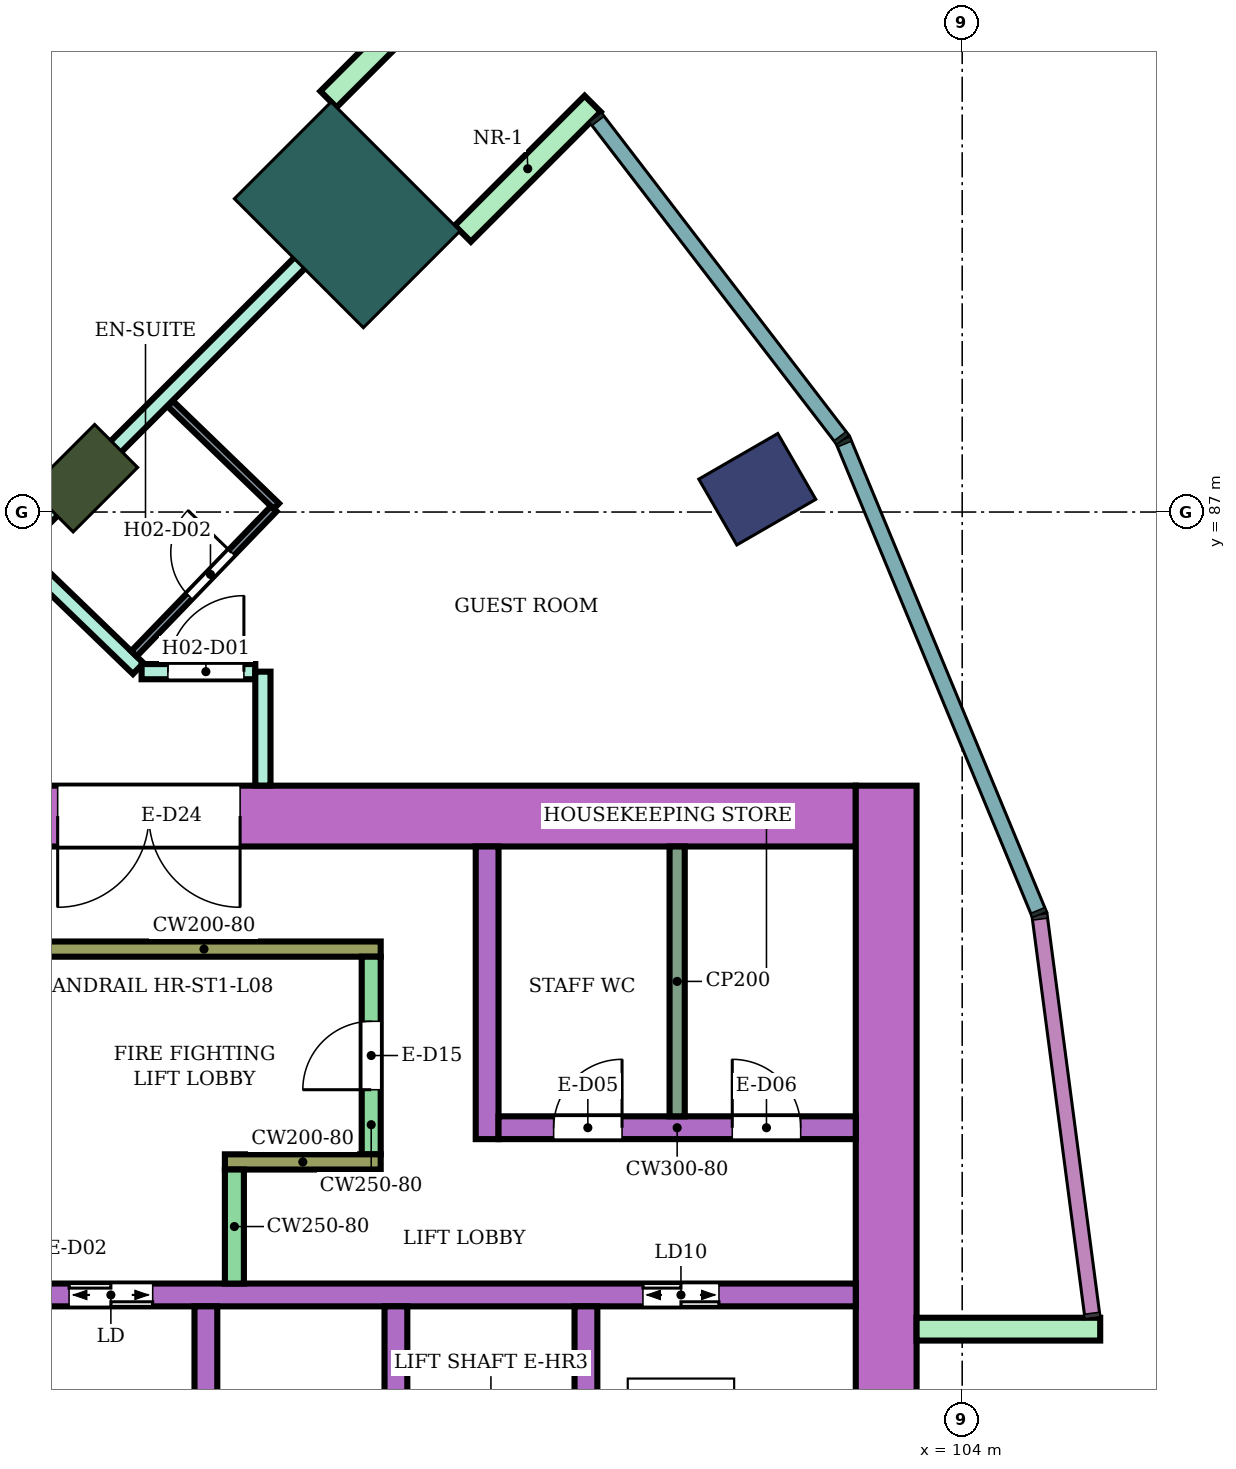
"""IFC4 building model, lengths in metres.
Left out: names, types, materials, properties, quantities, classifications, styles, units other than length and angle.
Written with IfcOpenShell. Run it as: python <this file> out.ifc"""

import sys

from ifc_helpers import new_model, si_unit, direction, frame, frame_2d, origin, origin_2d, place, context, subcontext, project, spatial, rectangle, extrude, element, fill, save


model = new_model("IFC4")
c1 = context("Model", 3, precision=1e-05, world=origin(), true_north=direction((0.0, 1.0)))
c2 = subcontext(c1, "Body", "Model", "MODEL_VIEW")
j1 = project(units=[si_unit("LENGTHUNIT", "METRE"), si_unit("PLANEANGLEUNIT", "RADIAN")], contexts=[c1])
p1 = place(None, origin())
s1 = spatial("IfcSite", under=j1, at=p1, CompositionType="ELEMENT")
p2 = place(p1, origin())
s2 = spatial("IfcBuilding", under=s1, at=p2, CompositionType="ELEMENT")
p3 = place(p2, frame((0.0, 0.0, 40.2)))
s3 = spatial("IfcBuildingStorey", under=s2, at=p3, CompositionType="ELEMENT", Elevation=40.2)
p4 = place(p3, frame((101.304, 87.3, 0.0), z_axis=(0.0, 0.0, 1.0), x_axis=(0.866025403784, 0.5, 0.0)))
e1 = element("IfcColumn", 1, at=p4, inside=s3, PredefinedType="COLUMN", context=c2, shape_type="SweptSolid", body=[
    extrude(rectangle(XDim=1.2, YDim=1.0, at=origin_2d()), origin(), (0.0, 0.0, 1.0), 3.8),
])
p5 = place(p3, frame((92.445, 87.445, 0.0), z_axis=(0.0, 0.0, 1.0), x_axis=(0.707106781187, 0.707106781187, 0.0)))
e2 = element("IfcColumn", 2, at=p5, inside=s3, PredefinedType="COLUMN", context=c2, shape_type="SweptSolid", body=[
    extrude(rectangle(XDim=1.2, YDim=0.8, at=origin_2d()), origin(), (0.0, 0.0, 1.0), 3.8),
])
p6 = place(p3, frame((95.91, 90.91, 0.0), z_axis=(0.0, 0.0, 1.0), x_axis=(0.707106781187, 0.707106781187, 0.0)))
e3 = element("IfcColumn", 3, at=p6, inside=s3, PredefinedType="COLUMN", context=c2, shape_type="SweptSolid", body=[
    extrude(rectangle(XDim=1.8, YDim=2.4, at=origin_2d()), origin(), (0.0, 0.0, 1.0), 3.8),
])
p7 = place(p3, frame((87.9, 83.0, 0.0), z_axis=(0.0, 0.0, 1.0), x_axis=(1.0, 0.0, 0.0)))
e4 = element("IfcWall", 4, at=p7, inside=s3, PredefinedType="SHEAR", context=c2, shape_type="SweptSolid", body=[
    extrude(rectangle(XDim=14.7, YDim=0.8, at=frame_2d((7.35, 0.0))), origin(), (0.0, 0.0, 1.0), 3.48),
])
p8 = place(p7, frame((4.2, 0.0, 0.0)))
e5 = element("IfcOpeningElement", 5, at=p8, cuts=e4, PredefinedType="OPENING", context=c2, shape_type="SweptSolid", body=[
    extrude(rectangle(XDim=2.4, YDim=2.4, at=frame_2d((1.2, 1.2))), frame((0.0, 0.41, 0.0), z_axis=(0.0, -1.0, 0.0), x_axis=(1.0, 0.0, 0.0)), (0.0, 0.0, 1.0), 0.82),
])
p9 = place(p3, frame((103.0, 66.6, 0.0), z_axis=(0.0, 0.0, 1.0), x_axis=(0.0, 1.0, 0.0)))
e6 = element("IfcWall", 6, at=p9, inside=s3, PredefinedType="SHEAR", context=c2, shape_type="SweptSolid", body=[
    extrude(rectangle(XDim=16.8, YDim=0.8, at=frame_2d((8.4, 0.0))), origin(), (0.0, 0.0, 1.0), 3.48),
])
p10 = place(p3, frame((91.7, 76.7, 0.0), z_axis=(0.0, 0.0, 1.0), x_axis=(1.0, 0.0, 0.0)))
e7 = element("IfcWall", 7, at=p10, inside=s3, PredefinedType="SHEAR", context=c2, shape_type="SweptSolid", body=[
    extrude(rectangle(XDim=10.9, YDim=0.3, at=frame_2d((5.45, 0.0))), origin(), (0.0, 0.0, 1.0), 3.48),
])
p11 = place(p10, frame((0.55, 0.0, 0.0)))
e8 = element("IfcOpeningElement", 8, at=p11, cuts=e7, PredefinedType="OPENING", context=c2, shape_type="SweptSolid", body=[
    extrude(rectangle(XDim=1.1, YDim=2.1, at=frame_2d((0.55, 1.05))), frame((0.0, 0.16, 0.0), z_axis=(0.0, -1.0, 0.0), x_axis=(1.0, 0.0, 0.0)), (0.0, 0.0, 1.0), 0.32),
])
p12 = place(p10, frame((8.1, 0.0, 0.0)))
e9 = element("IfcOpeningElement", 9, at=p12, cuts=e7, PredefinedType="OPENING", context=c2, shape_type="SweptSolid", body=[
    extrude(rectangle(XDim=1.0, YDim=2.1, at=frame_2d((0.5, 1.05))), frame((0.0, 0.16, 0.0), z_axis=(0.0, -1.0, 0.0), x_axis=(1.0, 0.0, 0.0)), (0.0, 0.0, 1.0), 0.32),
])
for number, where, z_axis, x_axis in (
    (10, (94.05, 74.0, 0.0), (0.0, 0.0, 1.0), (0.0, 1.0, 0.0)),
    (11, (96.55, 74.0, 0.0), (0.0, 0.0, 1.0), (0.0, 1.0, 0.0)),
    (12, (99.05, 74.0, 0.0), (0.0, 0.0, 1.0), (0.0, 1.0, 0.0)),
):
    element("IfcWall", number, at=place(p3, frame(where, z_axis=z_axis, x_axis=x_axis)), inside=s3, PredefinedType="SHEAR", context=c2, shape_type="SweptSolid", body=[
        extrude(rectangle(XDim=2.55, YDim=0.3, at=frame_2d((1.275, 0.0))), origin(), (0.0, 0.0, 1.0), 3.48),
    ])
p13 = place(p3, frame((91.7, 81.25, 0.0), z_axis=(0.0, 0.0, 1.0), x_axis=(1.0, 0.0, 0.0)))
e13 = element("IfcWall", 13, at=p13, inside=s3, PredefinedType="SHEAR", context=c2, shape_type="SweptSolid", body=[
    extrude(rectangle(XDim=4.65, YDim=0.2, at=frame_2d((2.325, 0.0))), origin(), (0.0, 0.0, 1.0), 3.48),
])
p14 = place(p3, frame((96.225, 78.55, 0.0), z_axis=(0.0, 0.0, 1.0), x_axis=(0.0, 1.0, 0.0)))
e14 = element("IfcWall", 14, at=p14, inside=s3, PredefinedType="SHEAR", context=c2, shape_type="SweptSolid", body=[
    extrude(rectangle(XDim=2.6, YDim=0.25, at=frame_2d((1.3, 0.0))), origin(), (0.0, 0.0, 1.0), 3.48),
])
p15 = place(p14, frame((0.85, 0.0, 0.0)))
e15 = element("IfcOpeningElement", 15, at=p15, cuts=e14, PredefinedType="OPENING", context=c2, shape_type="SweptSolid", body=[
    extrude(rectangle(XDim=0.9, YDim=2.1, at=frame_2d((0.45, 1.05))), frame((0.0, 0.135, 0.0), z_axis=(0.0, -1.0, 0.0), x_axis=(1.0, 0.0, 0.0)), (0.0, 0.0, 1.0), 0.27),
])
p16 = place(p3, frame((94.3, 78.45, 0.0), z_axis=(0.0, 0.0, 1.0), x_axis=(1.0, 0.0, 0.0)))
e16 = element("IfcWall", 16, at=p16, inside=s3, PredefinedType="SHEAR", context=c2, shape_type="SweptSolid", body=[
    extrude(rectangle(XDim=2.05, YDim=0.2, at=frame_2d((1.025, 0.0))), origin(), (0.0, 0.0, 1.0), 3.48),
])
p17 = place(p3, frame((94.425, 76.85, 0.0), z_axis=(0.0, 0.0, 1.0), x_axis=(0.0, 1.0, 0.0)))
e17 = element("IfcWall", 17, at=p17, inside=s3, PredefinedType="SHEAR", context=c2, shape_type="SweptSolid", body=[
    extrude(rectangle(XDim=1.5, YDim=0.25, at=frame_2d((0.75, 0.0))), origin(), (0.0, 0.0, 1.0), 3.48),
])
p18 = place(p3, frame((97.75, 78.75, 0.0), z_axis=(0.0, 0.0, 1.0), x_axis=(0.0, 1.0, 0.0)))
e18 = element("IfcWall", 18, at=p18, inside=s3, PredefinedType="SHEAR", context=c2, shape_type="SweptSolid", body=[
    extrude(rectangle(XDim=3.85, YDim=0.3, at=frame_2d((1.925, 0.0))), origin(), (0.0, 0.0, 1.0), 3.48),
])
p19 = place(p3, frame((97.9, 78.9, 0.0), z_axis=(0.0, 0.0, 1.0), x_axis=(1.0, 0.0, 0.0)))
e19 = element("IfcWall", 19, at=p19, inside=s3, PredefinedType="SHEAR", context=c2, shape_type="SweptSolid", body=[
    extrude(rectangle(XDim=4.7, YDim=0.3, at=frame_2d((2.35, 0.0))), origin(), (0.0, 0.0, 1.0), 3.48),
])
p20 = place(p19, frame((0.725, 0.0, 0.0)))
e20 = element("IfcOpeningElement", 20, at=p20, cuts=e19, PredefinedType="OPENING", context=c2, shape_type="SweptSolid", body=[
    extrude(rectangle(XDim=0.9, YDim=2.1, at=frame_2d((0.45, 1.05))), frame((0.0, 0.16, 0.0), z_axis=(0.0, -1.0, 0.0), x_axis=(1.0, 0.0, 0.0)), (0.0, 0.0, 1.0), 0.32),
])
p21 = place(p19, frame((3.075, 0.0, 0.0)))
e21 = element("IfcOpeningElement", 21, at=p21, cuts=e19, PredefinedType="OPENING", context=c2, shape_type="SweptSolid", body=[
    extrude(rectangle(XDim=0.9, YDim=2.1, at=frame_2d((0.45, 1.05))), frame((0.0, 0.16, 0.0), z_axis=(0.0, -1.0, 0.0), x_axis=(1.0, 0.0, 0.0)), (0.0, 0.0, 1.0), 0.32),
])
for number, where, z_axis, x_axis in (
    (22, (103.4, 76.25, 0.0), (0.0, 0.0, 1.0), (1.0, 0.0, 0.0)),
    (23, (97.43, 90.662, 0.0), (0.0, 0.0, 1.0), (0.707, 0.707, 0.0)),
    (24, (95.662, 92.43, 0.0), (0.0, 0.0, 1.0), (0.707, 0.707, 0.0)),
):
    element("IfcWall", number, at=place(p3, frame(where, z_axis=z_axis, x_axis=x_axis)), inside=s3, PredefinedType="NOTDEFINED", context=c2, shape_type="SweptSolid", body=[
        extrude(rectangle(XDim=2.416, YDim=0.3, at=frame_2d((1.208, 0.0))), origin(), (0.0, 0.0, 1.0), 3.8),
    ])
p22 = place(p3, frame((88.465, 89.473, 0.0), z_axis=(0.0, 0.0, 1.0), x_axis=(0.719474304909, -0.694519059908, 0.0)))
e25 = element("IfcWall", 25, at=p22, inside=s3, PredefinedType="PARTITIONING", context=c2, shape_type="SweptSolid", body=[
    extrude(rectangle(XDim=6.525, YDim=0.2, at=frame_2d((3.263, 0.0))), origin(), (0.0, 0.0, 1.0), 3.35),
])
p23 = place(p22, frame((2.719, 0.0, 0.0)))
e26 = element("IfcOpeningElement", 26, at=p23, cuts=e25, PredefinedType="OPENING", context=c2, shape_type="SweptSolid", body=[
    extrude(rectangle(XDim=1.0, YDim=2.1, at=frame_2d((0.5, 1.05))), frame((0.0, 0.11, 0.0), z_axis=(0.0, -1.0, 0.0), x_axis=(1.0, 0.0, 0.0)), (0.0, 0.0, 1.0), 0.22),
])
p24 = place(p3, frame((88.397, 89.539, 0.0), z_axis=(0.0, 0.0, 1.0), x_axis=(0.500228379329, 0.86589350876, 0.0)))
e27 = element("IfcWall", 27, at=p24, inside=s3, PredefinedType="PARTITIONING", context=c2, shape_type="SweptSolid", body=[
    extrude(rectangle(XDim=9.008, YDim=0.2, at=frame_2d((4.504, 0.0))), origin(), (0.0, 0.0, 1.0), 3.35),
])
p25 = place(p3, frame((91.595, 86.59, 0.0), z_axis=(0.0, 0.0, 1.0), x_axis=(0.707232337591, 0.706981202484, 0.0)))
e28 = element("IfcWall", 28, at=p25, inside=s3, PredefinedType="PARTITIONING", context=c2, shape_type="SweptSolid", body=[
    extrude(rectangle(XDim=6.805, YDim=0.2, at=frame_2d((3.402, 0.0))), origin(), (0.0, 0.0, 1.0), 3.35),
])
p26 = place(p3, frame((93.204, 84.9, 0.0), z_axis=(0.0, 0.0, 1.0), x_axis=(1.0, 0.0, 0.0)))
e29 = element("IfcWall", 29, at=p26, inside=s3, PredefinedType="PARTITIONING", context=c2, shape_type="SweptSolid", body=[
    extrude(rectangle(XDim=1.496, YDim=0.2, at=frame_2d((0.748, 0.0))), origin(), (0.0, 0.0, 1.0), 3.35),
])
p27 = place(p26, frame((0.346, 0.0, 0.0)))
e30 = element("IfcOpeningElement", 30, at=p27, cuts=e29, PredefinedType="OPENING", context=c2, shape_type="SweptSolid", body=[
    extrude(rectangle(XDim=1.0, YDim=2.1, at=frame_2d((0.5, 1.05))), frame((0.0, 0.11, 0.0), z_axis=(0.0, -1.0, 0.0), x_axis=(1.0, 0.0, 0.0)), (0.0, 0.0, 1.0), 0.22),
])
p28 = place(p3, frame((94.8, 83.401, 0.0), z_axis=(0.0, 0.0, 1.0), x_axis=(0.0, 1.0, 0.0)))
e31 = element("IfcWall", 31, at=p28, inside=s3, PredefinedType="PARTITIONING", context=c2, shape_type="SweptSolid", body=[
    extrude(rectangle(XDim=1.499, YDim=0.2, at=frame_2d((0.75, 0.0))), origin(), (0.0, 0.0, 1.0), 3.35),
])
p29 = place(p3, frame((93.104, 85.136, 0.0), z_axis=(0.0, 0.0, 1.0), x_axis=(0.694324808789, 0.719661767708, 0.0)))
e32 = element("IfcWall", 32, at=p29, inside=s3, PredefinedType="PARTITIONING", context=c2, shape_type="SweptSolid", body=[
    extrude(rectangle(XDim=2.65, YDim=0.1, at=frame_2d((1.325, 0.0))), origin(), (0.0, 0.0, 1.0), 3.35),
])
p30 = place(p29, frame((1.05, 0.0, 0.0)))
e33 = element("IfcOpeningElement", 33, at=p30, cuts=e32, PredefinedType="OPENING", context=c2, shape_type="SweptSolid", body=[
    extrude(rectangle(XDim=0.8, YDim=2.1, at=frame_2d((0.4, 1.05))), frame((0.0, 0.06, 0.0), z_axis=(0.0, -1.0, 0.0), x_axis=(1.0, 0.0, 0.0)), (0.0, 0.0, 1.0), 0.12),
])
p31 = place(p3, frame((93.582, 88.425, 0.0), z_axis=(0.0, 0.0, 1.0), x_axis=(0.719334224501, -0.694664144361, 0.0)))
e34 = element("IfcWall", 34, at=p31, inside=s3, PredefinedType="PARTITIONING", context=c2, shape_type="SweptSolid", body=[
    extrude(rectangle(XDim=1.94, YDim=0.1, at=frame_2d((0.97, 0.0))), origin(), (0.0, 0.0, 1.0), 3.35),
])
p32 = place(p3, frame((100.25, 79.05, 0.0), z_axis=(0.0, 0.0, 1.0), x_axis=(0.0, 1.0, 0.0)))
e35 = element("IfcWall", 35, at=p32, inside=s3, PredefinedType="PARTITIONING", context=c2, shape_type="SweptSolid", body=[
    extrude(rectangle(XDim=3.55, YDim=0.2, at=frame_2d((1.775, 0.0))), origin(), (0.0, 0.0, 1.0), 3.48),
])
p33 = place(p27, origin())
e36 = element("IfcDoor", 36, at=p33, inside=s3, OperationType="SINGLE_SWING_RIGHT", PredefinedType="DOOR", context=c2, shape_type="SweptSolid", body=[
    extrude(rectangle(XDim=1.0, YDim=2.1, at=frame_2d((0.5, 1.05))), frame((0.0, 0.025, 0.0), z_axis=(0.0, -1.0, 0.0), x_axis=(1.0, 0.0, 0.0)), (0.0, 0.0, 1.0), 0.05),
])
fill(e30, e36)
p34 = place(p30, origin())
e37 = element("IfcDoor", 37, at=p34, inside=s3, OperationType="SINGLE_SWING_RIGHT", PredefinedType="DOOR", context=c2, shape_type="SweptSolid", body=[
    extrude(rectangle(XDim=0.8, YDim=2.1, at=frame_2d((0.4, 1.05))), frame((0.0, 0.025, 0.0), z_axis=(0.0, -1.0, 0.0), x_axis=(1.0, 0.0, 0.0)), (0.0, 0.0, 1.0), 0.05),
])
fill(e33, e37)
p35 = place(p11, origin())
e38 = element("IfcDoor", 38, at=p35, inside=s3, OperationType="DOUBLE_DOOR_SLIDING", PredefinedType="DOOR", context=c2, shape_type="SweptSolid", body=[
    extrude(rectangle(XDim=1.1, YDim=2.1, at=frame_2d((0.55, 1.05))), frame((0.0, 0.025, 0.0), z_axis=(0.0, -1.0, 0.0), x_axis=(1.0, 0.0, 0.0)), (0.0, 0.0, 1.0), 0.05),
])
fill(e8, e38)
p36 = place(p12, origin())
e39 = element("IfcDoor", 39, at=p36, inside=s3, OperationType="DOUBLE_DOOR_SLIDING", PredefinedType="DOOR", context=c2, shape_type="SweptSolid", body=[
    extrude(rectangle(XDim=1.0, YDim=2.1, at=frame_2d((0.5, 1.05))), frame((0.0, 0.025, 0.0), z_axis=(0.0, -1.0, 0.0), x_axis=(1.0, 0.0, 0.0)), (0.0, 0.0, 1.0), 0.05),
])
fill(e9, e39)
p37 = place(p15, origin())
e40 = element("IfcDoor", 40, at=p37, inside=s3, OperationType="SINGLE_SWING_LEFT", PredefinedType="DOOR", context=c2, shape_type="SweptSolid", body=[
    extrude(rectangle(XDim=0.9, YDim=2.1, at=frame_2d((0.45, 1.05))), frame((0.0, 0.025, 0.0), z_axis=(0.0, -1.0, 0.0), x_axis=(1.0, 0.0, 0.0)), (0.0, 0.0, 1.0), 0.05),
])
fill(e15, e40)
p38 = place(p20, origin())
e41 = element("IfcDoor", 41, at=p38, inside=s3, OperationType="SINGLE_SWING_RIGHT", PredefinedType="DOOR", context=c2, shape_type="SweptSolid", body=[
    extrude(rectangle(XDim=0.9, YDim=2.1, at=frame_2d((0.45, 1.05))), frame((0.0, 0.025, 0.0), z_axis=(0.0, -1.0, 0.0), x_axis=(1.0, 0.0, 0.0)), (0.0, 0.0, 1.0), 0.05),
])
fill(e20, e41)
p39 = place(p21, origin())
e42 = element("IfcDoor", 42, at=p39, inside=s3, OperationType="SINGLE_SWING_LEFT", PredefinedType="DOOR", context=c2, shape_type="SweptSolid", body=[
    extrude(rectangle(XDim=0.9, YDim=2.1, at=frame_2d((0.45, 1.05))), frame((0.0, 0.025, 0.0), z_axis=(0.0, -1.0, 0.0), x_axis=(1.0, 0.0, 0.0)), (0.0, 0.0, 1.0), 0.05),
])
fill(e21, e42)
p40 = place(p8, frame((2.4, 0.0, 0.0), z_axis=(0.0, 0.0, 1.0), x_axis=(-1.0, 0.0, 0.0)))
e43 = element("IfcDoor", 43, at=p40, inside=s3, OperationType="DOUBLE_DOOR_SINGLE_SWING", PredefinedType="DOOR", context=c2, shape_type="SweptSolid", body=[
    extrude(rectangle(XDim=2.4, YDim=2.4, at=frame_2d((1.2, 1.2))), frame((0.0, 0.025, 0.0), z_axis=(0.0, -1.0, 0.0), x_axis=(1.0, 0.0, 0.0)), (0.0, 0.0, 1.0), 0.05),
])
fill(e5, e43)
save(model, sys.argv[1])
